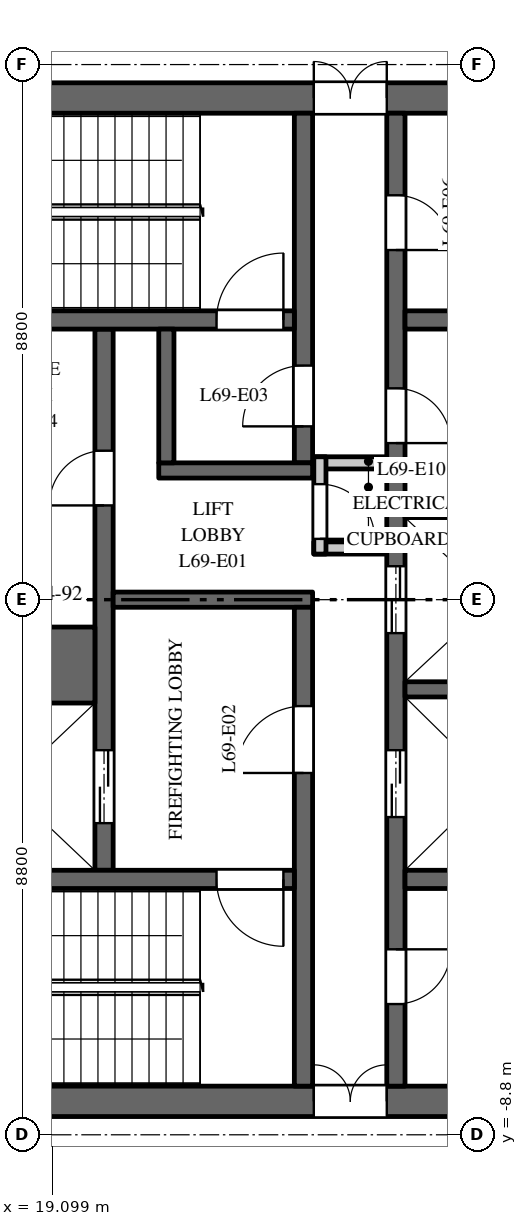
"""IFC4 building model, lengths in metres.
Left out: names, types, materials, properties, quantities, classifications, styles, units other than length and angle.
Written with IfcOpenShell. Run it as: python <this file> out.ifc"""

import sys

from ifc_helpers import new_model, si_unit, direction, frame, frame_2d, origin, place, context, subcontext, project, spatial, rectangle, extrude, element, fill, save


model = new_model("IFC4")
c1 = context("Model", 3, precision=1e-05, world=origin(), true_north=direction((0.0, 1.0)))
c2 = subcontext(c1, "Body", "Model", "MODEL_VIEW")
j1 = project(units=[si_unit("LENGTHUNIT", "METRE"), si_unit("PLANEANGLEUNIT", "RADIAN")], contexts=[c1])
p1 = place(None, origin())
s1 = spatial("IfcSite", under=j1, at=p1, CompositionType="ELEMENT")
p2 = place(p1, origin())
s2 = spatial("IfcBuilding", under=s1, at=p2, CompositionType="ELEMENT")
p3 = place(p2, frame((0.0, 0.0, 319.0)))
s3 = spatial("IfcBuildingStorey", under=s2, at=p3, CompositionType="ELEMENT", Elevation=319.0)
p4 = place(p3, frame((16.5, 8.25, 0.0), z_axis=(0.0, 0.0, 1.0), x_axis=(1.0, 0.0, 0.0)))
e1 = element("IfcWall", 1, at=p4, inside=s3, PredefinedType="SHEAR", context=c2, shape_type="SweptSolid", body=[
    extrude(rectangle(XDim=15.0, YDim=0.5, at=frame_2d((7.5, 0.0))), origin(), (0.0, 0.0, 1.0), 3.7),
])
p5 = place(p4, frame((6.9, 0.0, 0.0)))
e2 = element("IfcOpeningElement", 2, at=p5, cuts=e1, PredefinedType="OPENING", context=c2, shape_type="SweptSolid", body=[
    extrude(rectangle(XDim=1.2, YDim=2.1, at=frame_2d((0.6, 1.05))), frame((0.0, 0.26, 0.0), z_axis=(0.0, -1.0, 0.0), x_axis=(1.0, 0.0, 0.0)), (0.0, 0.0, 1.0), 0.52),
])
p6 = place(p4, frame((12.05, 0.0, 0.0)))
e3 = element("IfcOpeningElement", 3, at=p6, cuts=e1, PredefinedType="OPENING", context=c2, shape_type="SweptSolid", body=[
    extrude(rectangle(XDim=0.9, YDim=2.1, at=frame_2d((0.45, 1.05))), frame((0.0, 0.26, 0.0), z_axis=(0.0, -1.0, 0.0), x_axis=(1.0, 0.0, 0.0)), (0.0, 0.0, 1.0), 0.52),
])
p7 = place(p3, frame((16.5, -8.25, 0.0), z_axis=(0.0, 0.0, 1.0), x_axis=(1.0, 0.0, 0.0)))
e4 = element("IfcWall", 4, at=p7, inside=s3, PredefinedType="SHEAR", context=c2, shape_type="SweptSolid", body=[
    extrude(rectangle(XDim=15.0, YDim=0.5, at=frame_2d((7.5, 0.0))), origin(), (0.0, 0.0, 1.0), 3.7),
])
p8 = place(p7, frame((6.9, 0.0, 0.0)))
e5 = element("IfcOpeningElement", 5, at=p8, cuts=e4, PredefinedType="OPENING", context=c2, shape_type="SweptSolid", body=[
    extrude(rectangle(XDim=1.2, YDim=2.1, at=frame_2d((0.6, 1.05))), frame((0.0, 0.26, 0.0), z_axis=(0.0, -1.0, 0.0), x_axis=(1.0, 0.0, 0.0)), (0.0, 0.0, 1.0), 0.52),
])
p9 = place(p7, frame((12.425, 0.0, 0.0)))
e6 = element("IfcOpeningElement", 6, at=p9, cuts=e4, PredefinedType="OPENING", context=c2, shape_type="SweptSolid", body=[
    extrude(rectangle(XDim=0.9, YDim=2.1, at=frame_2d((0.45, 1.05))), frame((0.0, 0.26, 0.0), z_axis=(0.0, -1.0, 0.0), x_axis=(1.0, 0.0, 0.0)), (0.0, 0.0, 1.0), 0.52),
])
p10 = place(p3, frame((19.95, -4.45, 0.0), z_axis=(0.0, 0.0, 1.0), x_axis=(0.0, 1.0, 0.0)))
e7 = element("IfcWall", 7, at=p10, inside=s3, PredefinedType="SHEAR", context=c2, shape_type="SweptSolid", body=[
    extrude(rectangle(XDim=8.9, YDim=0.3, at=frame_2d((4.45, 0.0))), origin(), (0.0, 0.0, 1.0), 3.7),
])
p11 = place(p10, frame((0.775, 0.0, 0.0)))
e8 = element("IfcOpeningElement", 8, at=p11, cuts=e7, PredefinedType="OPENING", context=c2, shape_type="SweptSolid", body=[
    extrude(rectangle(XDim=1.2, YDim=2.1, at=frame_2d((0.6, 1.05))), frame((0.0, 0.16, 0.0), z_axis=(0.0, -1.0, 0.0), x_axis=(1.0, 0.0, 0.0)), (0.0, 0.0, 1.0), 0.32),
])
p12 = place(p10, frame((6.0, 0.0, 0.0)))
e9 = element("IfcOpeningElement", 9, at=p12, cuts=e7, PredefinedType="OPENING", context=c2, shape_type="SweptSolid", body=[
    extrude(rectangle(XDim=0.9, YDim=2.1, at=frame_2d((0.45, 1.05))), frame((0.0, 0.16, 0.0), z_axis=(0.0, -1.0, 0.0), x_axis=(1.0, 0.0, 0.0)), (0.0, 0.0, 1.0), 0.32),
])
p13 = place(p3, frame((24.75, -8.0, 0.0), z_axis=(0.0, 0.0, 1.0), x_axis=(0.0, 1.0, 0.0)))
e10 = element("IfcWall", 10, at=p13, inside=s3, PredefinedType="SHEAR", context=c2, shape_type="SweptSolid", body=[
    extrude(rectangle(XDim=16.0, YDim=0.3, at=frame_2d((8.0, 0.0))), origin(), (0.0, 0.0, 1.0), 3.7),
])
p14 = place(p13, frame((4.425, 0.0, 0.0)))
e11 = element("IfcOpeningElement", 11, at=p14, cuts=e10, PredefinedType="OPENING", context=c2, shape_type="SweptSolid", body=[
    extrude(rectangle(XDim=1.1, YDim=2.1, at=frame_2d((0.55, 1.05))), frame((0.0, 0.16, 0.0), z_axis=(0.0, -1.0, 0.0), x_axis=(1.0, 0.0, 0.0)), (0.0, 0.0, 1.0), 0.32),
])
p15 = place(p13, frame((7.45, 0.0, 0.0)))
e12 = element("IfcOpeningElement", 12, at=p15, cuts=e10, PredefinedType="OPENING", context=c2, shape_type="SweptSolid", body=[
    extrude(rectangle(XDim=1.1, YDim=2.1, at=frame_2d((0.55, 1.05))), frame((0.0, 0.16, 0.0), z_axis=(0.0, -1.0, 0.0), x_axis=(1.0, 0.0, 0.0)), (0.0, 0.0, 1.0), 0.32),
])
p16 = place(p13, frame((10.575, 0.0, 0.0)))
e13 = element("IfcOpeningElement", 13, at=p16, cuts=e10, PredefinedType="OPENING", context=c2, shape_type="SweptSolid", body=[
    extrude(rectangle(XDim=0.9, YDim=2.1, at=frame_2d((0.45, 1.05))), frame((0.0, 0.16, 0.0), z_axis=(0.0, -1.0, 0.0), x_axis=(1.0, 0.0, 0.0)), (0.0, 0.0, 1.0), 0.32),
])
p17 = place(p13, frame((13.75, 0.0, 0.0)))
e14 = element("IfcOpeningElement", 14, at=p17, cuts=e10, PredefinedType="OPENING", context=c2, shape_type="SweptSolid", body=[
    extrude(rectangle(XDim=0.9, YDim=2.1, at=frame_2d((0.45, 1.05))), frame((0.0, 0.16, 0.0), z_axis=(0.0, -1.0, 0.0), x_axis=(1.0, 0.0, 0.0)), (0.0, 0.0, 1.0), 0.32),
])
p18 = place(p13, frame((1.35, 0.0, 0.0)))
e15 = element("IfcOpeningElement", 15, at=p18, cuts=e10, PredefinedType="OPENING", context=c2, shape_type="SweptSolid", body=[
    extrude(rectangle(XDim=0.9, YDim=2.1, at=frame_2d((0.45, 1.05))), frame((0.0, 0.16, 0.0), z_axis=(0.0, -1.0, 0.0), x_axis=(1.0, 0.0, 0.0)), (0.0, 0.0, 1.0), 0.32),
])
p19 = place(p3, frame((20.1, 0.0, 0.0), z_axis=(0.0, 0.0, 1.0), x_axis=(1.0, 0.0, 0.0)))
e16 = element("IfcWall", 16, at=p19, inside=s3, PredefinedType="SHEAR", context=c2, shape_type="SweptSolid", body=[
    extrude(rectangle(XDim=3.28, YDim=0.25, at=frame_2d((1.64, 0.0))), origin(), (0.0, 0.0, 1.0), 3.7),
])
for number, where, z_axis, x_axis in (
    (17, (23.4, 0.85, 0.0), (0.0, 0.0, 1.0), (1.0, 0.0, 0.0)),
    (18, (23.4, 2.25, 0.0), (0.0, 0.0, 1.0), (1.0, 0.0, 0.0)),
):
    element("IfcWall", number, at=place(p3, frame(where, z_axis=z_axis, x_axis=x_axis)), inside=s3, PredefinedType="PARTITIONING", context=c2, shape_type="SweptSolid", body=[
        extrude(rectangle(XDim=1.2, YDim=0.2, at=frame_2d((0.6, 0.0))), origin(), (0.0, 0.0, 1.0), 3.7),
    ])
p20 = place(p3, frame((23.5, 0.75, 0.0), z_axis=(0.0, 0.0, 1.0), x_axis=(0.0, 1.0, 0.0)))
e19 = element("IfcWall", 19, at=p20, inside=s3, PredefinedType="PARTITIONING", context=c2, shape_type="SweptSolid", body=[
    extrude(rectangle(XDim=1.6, YDim=0.2, at=frame_2d((0.8, 0.0))), origin(), (0.0, 0.0, 1.0), 3.7),
])
p21 = place(p20, frame((0.25, 0.0, 0.0)))
e20 = element("IfcOpeningElement", 20, at=p21, cuts=e19, PredefinedType="OPENING", context=c2, shape_type="SweptSolid", body=[
    extrude(rectangle(XDim=0.9, YDim=2.1, at=frame_2d((0.45, 1.05))), frame((0.0, 0.11, 0.0), z_axis=(0.0, -1.0, 0.0), x_axis=(1.0, 0.0, 0.0)), (0.0, 0.0, 1.0), 0.22),
])
p22 = place(p3, frame((24.9, 4.6, 0.0), z_axis=(0.0, 0.0, 1.0), x_axis=(1.0, 0.0, 0.0)))
e21 = element("IfcWall", 21, at=p22, inside=s3, PredefinedType="SHEAR", context=c2, shape_type="SweptSolid", body=[
    extrude(rectangle(XDim=6.1, YDim=0.3, at=frame_2d((3.05, 0.0))), origin(), (0.0, 0.0, 1.0), 3.7),
])
p23 = place(p3, frame((24.9, -4.6, 0.0), z_axis=(0.0, 0.0, 1.0), x_axis=(1.0, 0.0, 0.0)))
e22 = element("IfcWall", 22, at=p23, inside=s3, PredefinedType="SHEAR", context=c2, shape_type="SweptSolid", body=[
    extrude(rectangle(XDim=6.1, YDim=0.3, at=frame_2d((3.05, 0.0))), origin(), (0.0, 0.0, 1.0), 3.7),
])
p24 = place(p23, frame((4.2, 0.0, 0.0)))
e23 = element("IfcOpeningElement", 23, at=p24, cuts=e22, PredefinedType="OPENING", context=c2, shape_type="SweptSolid", body=[
    extrude(rectangle(XDim=0.9, YDim=2.1, at=frame_2d((0.45, 1.05))), frame((0.0, 0.16, 0.0), z_axis=(0.0, -1.0, 0.0), x_axis=(1.0, 0.0, 0.0)), (0.0, 0.0, 1.0), 0.32),
])
p25 = place(p3, frame((16.9, -1.075, 0.0), z_axis=(0.0, 0.0, 1.0), x_axis=(1.0, 0.0, 0.0)))
e24 = element("IfcWall", 24, at=p25, inside=s3, PredefinedType="SHEAR", context=c2, shape_type="SweptSolid", body=[
    extrude(rectangle(XDim=2.9, YDim=1.25, at=frame_2d((1.45, 0.0))), origin(), (0.0, 0.0, 1.0), 3.7),
])
for number, where, z_axis, x_axis in (
    (25, (24.9, -1.475, 0.0), (0.0, 0.0, 1.0), (1.0, 0.0, 0.0)),
    (26, (24.9, 1.475, 0.0), (0.0, 0.0, 1.0), (1.0, 0.0, 0.0)),
):
    element("IfcWall", number, at=place(p3, frame(where, z_axis=z_axis, x_axis=x_axis)), inside=s3, PredefinedType="SHEAR", context=c2, shape_type="SweptSolid", body=[
        extrude(rectangle(XDim=2.9, YDim=0.25, at=frame_2d((1.45, 0.0))), origin(), (0.0, 0.0, 1.0), 3.7),
    ])
p26 = place(p3, frame((23.23, 2.25, 0.0), z_axis=(0.0, 0.0, 1.0), x_axis=(0.0, 1.0, 0.0)))
e27 = element("IfcWall", 27, at=p26, inside=s3, PredefinedType="SHEAR", context=c2, shape_type="SweptSolid", body=[
    extrude(rectangle(XDim=5.75, YDim=0.3, at=frame_2d((2.875, 0.0))), origin(), (0.0, 0.0, 1.0), 3.7),
])
p27 = place(p26, frame((0.6, 0.0, 0.0)))
e28 = element("IfcOpeningElement", 28, at=p27, cuts=e27, PredefinedType="OPENING", context=c2, shape_type="SweptSolid", body=[
    extrude(rectangle(XDim=1.0, YDim=2.1, at=frame_2d((0.5, 1.05))), frame((0.0, 0.16, 0.0), z_axis=(0.0, -1.0, 0.0), x_axis=(1.0, 0.0, 0.0)), (0.0, 0.0, 1.0), 0.32),
])
p28 = place(p3, frame((23.23, -8.0, 0.0), z_axis=(0.0, 0.0, 1.0), x_axis=(0.0, 1.0, 0.0)))
e29 = element("IfcWall", 29, at=p28, inside=s3, PredefinedType="SHEAR", context=c2, shape_type="SweptSolid", body=[
    extrude(rectangle(XDim=7.875, YDim=0.3, at=frame_2d((3.938, 0.0))), origin(), (0.0, 0.0, 1.0), 3.7),
])
p29 = place(p28, frame((5.15, 0.0, 0.0)))
e30 = element("IfcOpeningElement", 30, at=p29, cuts=e29, PredefinedType="OPENING", context=c2, shape_type="SweptSolid", body=[
    extrude(rectangle(XDim=1.1, YDim=2.1, at=frame_2d((0.55, 1.05))), frame((0.0, 0.16, 0.0), z_axis=(0.0, -1.0, 0.0), x_axis=(1.0, 0.0, 0.0)), (0.0, 0.0, 1.0), 0.32),
])
p30 = place(p3, frame((16.9, 4.6, 0.0), z_axis=(0.0, 0.0, 1.0), x_axis=(1.0, 0.0, 0.0)))
e31 = element("IfcWall", 31, at=p30, inside=s3, PredefinedType="SHEAR", context=c2, shape_type="SweptSolid", body=[
    extrude(rectangle(XDim=6.18, YDim=0.3, at=frame_2d((3.09, 0.0))), origin(), (0.0, 0.0, 1.0), 3.7),
])
p31 = place(p30, frame((4.9, 0.0, 0.0)))
e32 = element("IfcOpeningElement", 32, at=p31, cuts=e31, PredefinedType="OPENING", context=c2, shape_type="SweptSolid", body=[
    extrude(rectangle(XDim=1.1, YDim=2.1, at=frame_2d((0.55, 1.05))), frame((0.0, 0.16, 0.0), z_axis=(0.0, -1.0, 0.0), x_axis=(1.0, 0.0, 0.0)), (0.0, 0.0, 1.0), 0.32),
])
p32 = place(p3, frame((16.9, -4.6, 0.0), z_axis=(0.0, 0.0, 1.0), x_axis=(1.0, 0.0, 0.0)))
e33 = element("IfcWall", 33, at=p32, inside=s3, PredefinedType="SHEAR", context=c2, shape_type="SweptSolid", body=[
    extrude(rectangle(XDim=6.18, YDim=0.3, at=frame_2d((3.09, 0.0))), origin(), (0.0, 0.0, 1.0), 3.7),
])
p33 = place(p32, frame((4.9, 0.0, 0.0)))
e34 = element("IfcOpeningElement", 34, at=p33, cuts=e33, PredefinedType="OPENING", context=c2, shape_type="SweptSolid", body=[
    extrude(rectangle(XDim=1.1, YDim=2.1, at=frame_2d((0.55, 1.05))), frame((0.0, 0.16, 0.0), z_axis=(0.0, -1.0, 0.0), x_axis=(1.0, 0.0, 0.0)), (0.0, 0.0, 1.0), 0.32),
])
p34 = place(p3, frame((20.85, 2.125, 0.0), z_axis=(0.0, 0.0, 1.0), x_axis=(1.0, 0.0, 0.0)))
e35 = element("IfcWall", 35, at=p34, inside=s3, PredefinedType="SHEAR", context=c2, shape_type="SweptSolid", body=[
    extrude(rectangle(XDim=2.53, YDim=0.25, at=frame_2d((1.265, 0.0))), origin(), (0.0, 0.0, 1.0), 3.7),
])
p35 = place(p3, frame((20.975, 2.25, 0.0), z_axis=(0.0, 0.0, 1.0), x_axis=(0.0, 1.0, 0.0)))
e36 = element("IfcWall", 36, at=p35, inside=s3, PredefinedType="SHEAR", context=c2, shape_type="SweptSolid", body=[
    extrude(rectangle(XDim=2.2, YDim=0.25, at=frame_2d((1.1, 0.0))), origin(), (0.0, 0.0, 1.0), 3.7),
])
p36 = place(p3, frame((14.33, 8.256, 0.0), z_axis=(0.0, 0.0, 1.0), x_axis=(0.542279133869, 0.840198393816, 0.0)))
e37 = element("IfcWall", 37, at=p36, inside=s3, PredefinedType="PARTITIONING", context=c2, shape_type="SweptSolid", body=[
    extrude(rectangle(XDim=15.813, YDim=0.1, at=frame_2d((7.906, 0.0))), origin(), (0.0, 0.0, 1.0), 3.7),
])
p37 = place(p11, origin())
e38 = element("IfcDoor", 38, at=p37, inside=s3, OperationType="DOUBLE_DOOR_SLIDING", PredefinedType="DOOR", context=c2, shape_type="SweptSolid", body=[
    extrude(rectangle(XDim=1.2, YDim=2.1, at=frame_2d((0.6, 1.05))), frame((0.0, 0.025, 0.0), z_axis=(0.0, -1.0, 0.0), x_axis=(1.0, 0.0, 0.0)), (0.0, 0.0, 1.0), 0.05),
])
fill(e8, e38)
p38 = place(p14, origin())
e39 = element("IfcDoor", 39, at=p38, inside=s3, OperationType="DOUBLE_DOOR_SLIDING", PredefinedType="DOOR", context=c2, shape_type="SweptSolid", body=[
    extrude(rectangle(XDim=1.1, YDim=2.1, at=frame_2d((0.55, 1.05))), frame((0.0, 0.025, 0.0), z_axis=(0.0, -1.0, 0.0), x_axis=(1.0, 0.0, 0.0)), (0.0, 0.0, 1.0), 0.05),
])
fill(e11, e39)
p39 = place(p15, origin())
e40 = element("IfcDoor", 40, at=p39, inside=s3, OperationType="DOUBLE_DOOR_SLIDING", PredefinedType="DOOR", context=c2, shape_type="SweptSolid", body=[
    extrude(rectangle(XDim=1.1, YDim=2.1, at=frame_2d((0.55, 1.05))), frame((0.0, 0.025, 0.0), z_axis=(0.0, -1.0, 0.0), x_axis=(1.0, 0.0, 0.0)), (0.0, 0.0, 1.0), 0.05),
])
fill(e12, e40)
p40 = place(p31, origin())
e41 = element("IfcDoor", 41, at=p40, inside=s3, OperationType="SINGLE_SWING_LEFT", PredefinedType="DOOR", context=c2, shape_type="SweptSolid", body=[
    extrude(rectangle(XDim=1.1, YDim=2.1, at=frame_2d((0.55, 1.05))), frame((0.0, 0.025, 0.0), z_axis=(0.0, -1.0, 0.0), x_axis=(1.0, 0.0, 0.0)), (0.0, 0.0, 1.0), 0.05),
])
fill(e32, e41)
p41 = place(p33, origin())
e42 = element("IfcDoor", 42, at=p41, inside=s3, OperationType="SINGLE_SWING_RIGHT", PredefinedType="DOOR", context=c2, shape_type="SweptSolid", body=[
    extrude(rectangle(XDim=1.1, YDim=2.1, at=frame_2d((0.55, 1.05))), frame((0.0, 0.025, 0.0), z_axis=(0.0, -1.0, 0.0), x_axis=(1.0, 0.0, 0.0)), (0.0, 0.0, 1.0), 0.05),
])
fill(e34, e42)
p42 = place(p29, origin())
e43 = element("IfcDoor", 43, at=p42, inside=s3, OperationType="SINGLE_SWING_RIGHT", PredefinedType="DOOR", context=c2, shape_type="SweptSolid", body=[
    extrude(rectangle(XDim=1.1, YDim=2.1, at=frame_2d((0.55, 1.05))), frame((0.0, 0.025, 0.0), z_axis=(0.0, -1.0, 0.0), x_axis=(1.0, 0.0, 0.0)), (0.0, 0.0, 1.0), 0.05),
])
fill(e30, e43)
p43 = place(p27, origin())
e44 = element("IfcDoor", 44, at=p43, inside=s3, OperationType="SINGLE_SWING_RIGHT", PredefinedType="DOOR", context=c2, shape_type="SweptSolid", body=[
    extrude(rectangle(XDim=1.0, YDim=2.1, at=frame_2d((0.5, 1.05))), frame((0.0, 0.025, 0.0), z_axis=(0.0, -1.0, 0.0), x_axis=(1.0, 0.0, 0.0)), (0.0, 0.0, 1.0), 0.05),
])
fill(e28, e44)
p44 = place(p5, origin())
e45 = element("IfcDoor", 45, at=p44, inside=s3, OperationType="DOUBLE_DOOR_DOUBLE_SWING", PredefinedType="DOOR", context=c2, shape_type="SweptSolid", body=[
    extrude(rectangle(XDim=1.2, YDim=2.1, at=frame_2d((0.6, 1.05))), frame((0.0, 0.025, 0.0), z_axis=(0.0, -1.0, 0.0), x_axis=(1.0, 0.0, 0.0)), (0.0, 0.0, 1.0), 0.05),
])
fill(e2, e45)
p45 = place(p8, origin())
e46 = element("IfcDoor", 46, at=p45, inside=s3, OperationType="DOUBLE_DOOR_DOUBLE_SWING", PredefinedType="DOOR", context=c2, shape_type="SweptSolid", body=[
    extrude(rectangle(XDim=1.2, YDim=2.1, at=frame_2d((0.6, 1.05))), frame((0.0, 0.025, 0.0), z_axis=(0.0, -1.0, 0.0), x_axis=(1.0, 0.0, 0.0)), (0.0, 0.0, 1.0), 0.05),
])
fill(e5, e46)
p46 = place(p12, origin())
e47 = element("IfcDoor", 47, at=p46, inside=s3, OperationType="SINGLE_SWING_RIGHT", PredefinedType="DOOR", context=c2, shape_type="SweptSolid", body=[
    extrude(rectangle(XDim=0.9, YDim=2.1, at=frame_2d((0.45, 1.05))), frame((0.0, 0.025, 0.0), z_axis=(0.0, -1.0, 0.0), x_axis=(1.0, 0.0, 0.0)), (0.0, 0.0, 1.0), 0.05),
])
fill(e9, e47)
p47 = place(p16, origin())
e48 = element("IfcDoor", 48, at=p47, inside=s3, OperationType="SINGLE_SWING_LEFT", PredefinedType="DOOR", context=c2, shape_type="SweptSolid", body=[
    extrude(rectangle(XDim=0.9, YDim=2.1, at=frame_2d((0.45, 1.05))), frame((0.0, 0.025, 0.0), z_axis=(0.0, -1.0, 0.0), x_axis=(1.0, 0.0, 0.0)), (0.0, 0.0, 1.0), 0.05),
])
fill(e13, e48)
p48 = place(p17, origin())
e49 = element("IfcDoor", 49, at=p48, inside=s3, OperationType="SINGLE_SWING_LEFT", PredefinedType="DOOR", context=c2, shape_type="SweptSolid", body=[
    extrude(rectangle(XDim=0.9, YDim=2.1, at=frame_2d((0.45, 1.05))), frame((0.0, 0.025, 0.0), z_axis=(0.0, -1.0, 0.0), x_axis=(1.0, 0.0, 0.0)), (0.0, 0.0, 1.0), 0.05),
])
fill(e14, e49)
p49 = place(p18, origin())
e50 = element("IfcDoor", 50, at=p49, inside=s3, OperationType="SINGLE_SWING_RIGHT", PredefinedType="DOOR", context=c2, shape_type="SweptSolid", body=[
    extrude(rectangle(XDim=0.9, YDim=2.1, at=frame_2d((0.45, 1.05))), frame((0.0, 0.025, 0.0), z_axis=(0.0, -1.0, 0.0), x_axis=(1.0, 0.0, 0.0)), (0.0, 0.0, 1.0), 0.05),
])
fill(e15, e50)
p50 = place(p21, origin())
e51 = element("IfcDoor", 51, at=p50, inside=s3, OperationType="SINGLE_SWING_LEFT", PredefinedType="DOOR", context=c2, shape_type="SweptSolid", body=[
    extrude(rectangle(XDim=0.9, YDim=2.1, at=frame_2d((0.45, 1.05))), frame((0.0, 0.025, 0.0), z_axis=(0.0, -1.0, 0.0), x_axis=(1.0, 0.0, 0.0)), (0.0, 0.0, 1.0), 0.05),
])
fill(e20, e51)
save(model, sys.argv[1])
